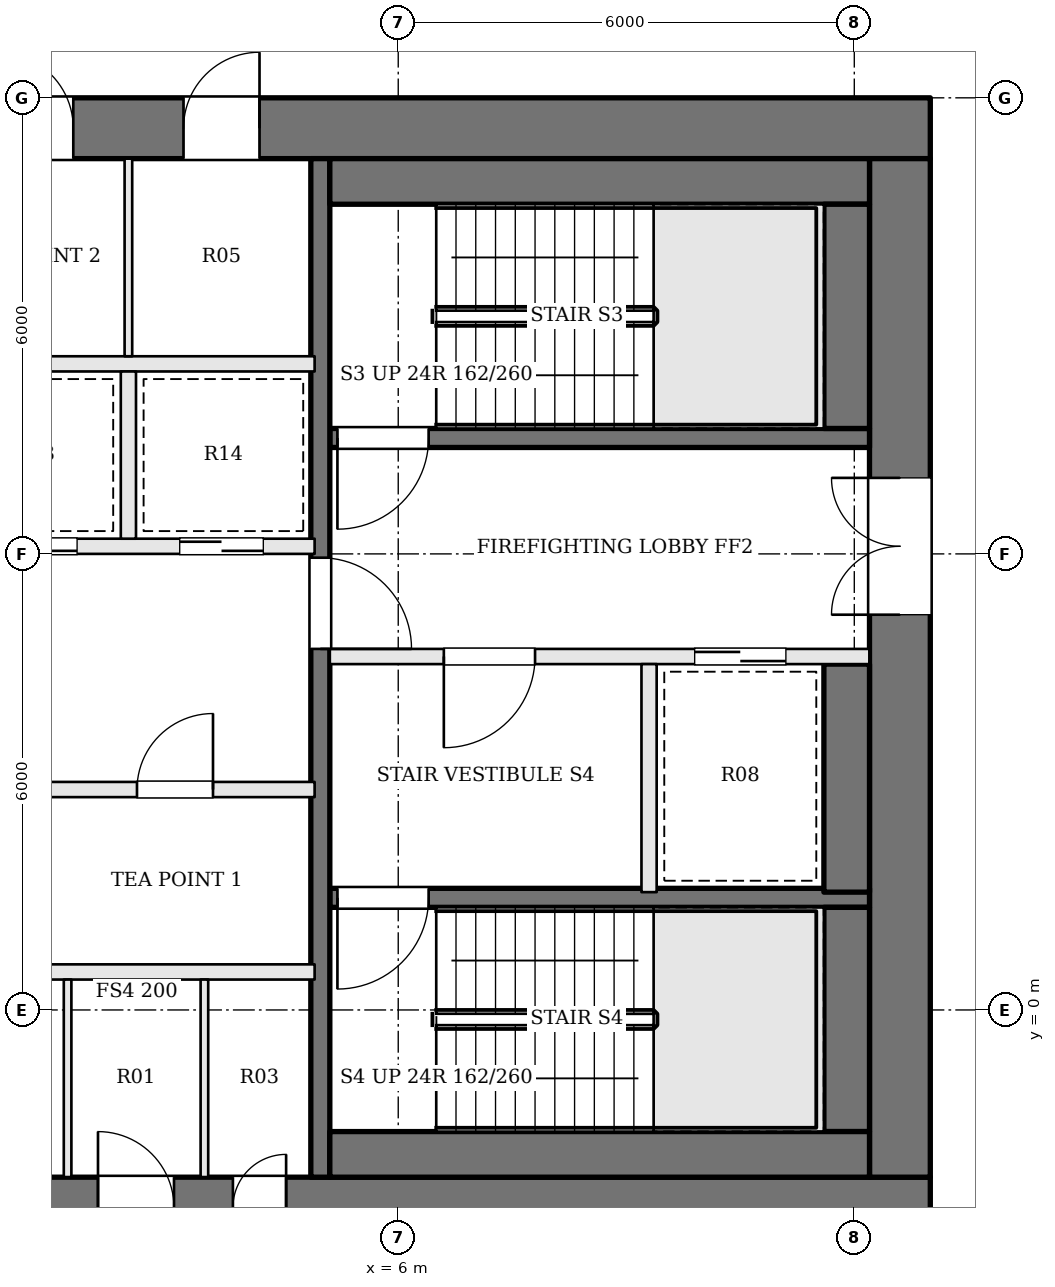
"""IFC4 building model, lengths in metres.
Left out: names, types, materials, properties, quantities, classifications, styles, units other than length and angle.
Written with IfcOpenShell. Run it as: python <this file> out.ifc"""

import sys

from ifc_helpers import new_model, si_unit, direction, frame, frame_2d, origin, place, context, subcontext, project, spatial, rectangle, extrude, element, fill, save


model = new_model("IFC4")
c1 = context("Model", 3, precision=1e-05, world=origin(), true_north=direction((0.0, 1.0)))
c2 = subcontext(c1, "Body", "Model", "MODEL_VIEW")
j1 = project(units=[si_unit("LENGTHUNIT", "METRE"), si_unit("PLANEANGLEUNIT", "RADIAN")], contexts=[c1])
p1 = place(None, origin())
s1 = spatial("IfcSite", under=j1, at=p1, CompositionType="ELEMENT")
p2 = place(p1, origin())
s2 = spatial("IfcBuilding", under=s1, at=p2, CompositionType="ELEMENT")
p3 = place(p2, frame((0.0, 0.0, 189.6)))
s3 = spatial("IfcBuildingStorey", under=s2, at=p3, CompositionType="ELEMENT", Elevation=189.6)
p4 = place(p3, frame((-13.0, 11.6, 0.0), z_axis=(0.0, 0.0, 1.0), x_axis=(1.0, 0.0, 0.0)))
e1 = element("IfcWall", 1, at=p4, inside=s3, PredefinedType="SHEAR", context=c2, shape_type="SweptSolid", body=[
    extrude(rectangle(XDim=26.0, YDim=0.8, at=frame_2d((13.0, 0.0))), origin(), (0.0, 0.0, 1.0), 3.9),
])
p5 = place(p4, frame((8.975, 0.0, 0.0)))
e2 = element("IfcOpeningElement", 2, at=p5, cuts=e1, PredefinedType="OPENING", context=c2, shape_type="SweptSolid", body=[
    extrude(rectangle(XDim=0.7, YDim=2.1, at=frame_2d((0.35, 1.05))), frame((0.0, 0.41, 0.0), z_axis=(0.0, -1.0, 0.0), x_axis=(1.0, 0.0, 0.0)), (0.0, 0.0, 1.0), 0.82),
])
p6 = place(p4, frame((11.425, 0.0, 0.0)))
e3 = element("IfcOpeningElement", 3, at=p6, cuts=e1, PredefinedType="OPENING", context=c2, shape_type="SweptSolid", body=[
    extrude(rectangle(XDim=0.7, YDim=2.1, at=frame_2d((0.35, 1.05))), frame((0.0, 0.41, 0.0), z_axis=(0.0, -1.0, 0.0), x_axis=(1.0, 0.0, 0.0)), (0.0, 0.0, 1.0), 0.82),
])
p7 = place(p4, frame((13.725, 0.0, 0.0)))
e4 = element("IfcOpeningElement", 4, at=p7, cuts=e1, PredefinedType="OPENING", context=c2, shape_type="SweptSolid", body=[
    extrude(rectangle(XDim=1.0, YDim=2.1, at=frame_2d((0.5, 1.05))), frame((0.0, 0.41, 0.0), z_axis=(0.0, -1.0, 0.0), x_axis=(1.0, 0.0, 0.0)), (0.0, 0.0, 1.0), 0.82),
])
p8 = place(p4, frame((16.175, 0.0, 0.0)))
e5 = element("IfcOpeningElement", 5, at=p8, cuts=e1, PredefinedType="OPENING", context=c2, shape_type="SweptSolid", body=[
    extrude(rectangle(XDim=1.0, YDim=2.1, at=frame_2d((0.5, 1.05))), frame((0.0, 0.41, 0.0), z_axis=(0.0, -1.0, 0.0), x_axis=(1.0, 0.0, 0.0)), (0.0, 0.0, 1.0), 0.82),
])
p9 = place(p3, frame((-13.0, -2.6, 0.0), z_axis=(0.0, 0.0, 1.0), x_axis=(1.0, 0.0, 0.0)))
e6 = element("IfcWall", 6, at=p9, inside=s3, PredefinedType="SHEAR", context=c2, shape_type="SweptSolid", body=[
    extrude(rectangle(XDim=26.0, YDim=0.8, at=frame_2d((13.0, 0.0))), origin(), (0.0, 0.0, 1.0), 3.9),
])
p10 = place(p9, frame((9.475, 0.0, 0.0)))
e7 = element("IfcOpeningElement", 7, at=p10, cuts=e6, PredefinedType="OPENING", context=c2, shape_type="SweptSolid", body=[
    extrude(rectangle(XDim=0.9, YDim=2.1, at=frame_2d((0.45, 1.05))), frame((0.0, 0.41, 0.0), z_axis=(0.0, -1.0, 0.0), x_axis=(1.0, 0.0, 0.0)), (0.0, 0.0, 1.0), 0.82),
])
p11 = place(p9, frame((12.75, 0.0, 0.0)))
e8 = element("IfcOpeningElement", 8, at=p11, cuts=e6, PredefinedType="OPENING", context=c2, shape_type="SweptSolid", body=[
    extrude(rectangle(XDim=0.9, YDim=2.1, at=frame_2d((0.45, 1.05))), frame((0.0, 0.41, 0.0), z_axis=(0.0, -1.0, 0.0), x_axis=(1.0, 0.0, 0.0)), (0.0, 0.0, 1.0), 0.82),
])
p12 = place(p9, frame((15.05, 0.0, 0.0)))
e9 = element("IfcOpeningElement", 9, at=p12, cuts=e6, PredefinedType="OPENING", context=c2, shape_type="SweptSolid", body=[
    extrude(rectangle(XDim=1.0, YDim=2.1, at=frame_2d((0.5, 1.05))), frame((0.0, 0.41, 0.0), z_axis=(0.0, -1.0, 0.0), x_axis=(1.0, 0.0, 0.0)), (0.0, 0.0, 1.0), 0.82),
])
p13 = place(p9, frame((16.825, 0.0, 0.0)))
e10 = element("IfcOpeningElement", 10, at=p13, cuts=e6, PredefinedType="OPENING", context=c2, shape_type="SweptSolid", body=[
    extrude(rectangle(XDim=0.7, YDim=2.1, at=frame_2d((0.35, 1.05))), frame((0.0, 0.41, 0.0), z_axis=(0.0, -1.0, 0.0), x_axis=(1.0, 0.0, 0.0)), (0.0, 0.0, 1.0), 0.82),
])
p14 = place(p3, frame((12.6, -2.2, 0.0), z_axis=(0.0, 0.0, 1.0), x_axis=(0.0, 1.0, 0.0)))
e11 = element("IfcWall", 11, at=p14, inside=s3, PredefinedType="SHEAR", context=c2, shape_type="SweptSolid", body=[
    extrude(rectangle(XDim=13.4, YDim=0.8, at=frame_2d((6.7, 0.0))), origin(), (0.0, 0.0, 1.0), 3.9),
])
p15 = place(p14, frame((7.4, 0.0, 0.0)))
e12 = element("IfcOpeningElement", 12, at=p15, cuts=e11, PredefinedType="OPENING", context=c2, shape_type="SweptSolid", body=[
    extrude(rectangle(XDim=1.8, YDim=2.1, at=frame_2d((0.9, 1.05))), frame((0.0, 0.41, 0.0), z_axis=(0.0, -1.0, 0.0), x_axis=(1.0, 0.0, 0.0)), (0.0, 0.0, 1.0), 0.82),
])
p16 = place(p3, frame((12.2, 7.525, 0.0), z_axis=(0.0, 0.0, 1.0), x_axis=(-1.0, 0.0, 0.0)))
e13 = element("IfcWall", 13, at=p16, inside=s3, PredefinedType="SOLIDWALL", context=c2, shape_type="SweptSolid", body=[
    extrude(rectangle(XDim=7.1, YDim=0.25, at=frame_2d((3.55, 0.0))), origin(), (0.0, 0.0, 1.0), 3.7),
])
p17 = place(p16, frame((5.8, 0.0, 0.0)))
e14 = element("IfcOpeningElement", 14, at=p17, cuts=e13, PredefinedType="OPENING", context=c2, shape_type="SweptSolid", body=[
    extrude(rectangle(XDim=1.2, YDim=2.1, at=frame_2d((0.6, 1.05))), frame((0.0, 0.135, 0.0), z_axis=(0.0, -1.0, 0.0), x_axis=(1.0, 0.0, 0.0)), (0.0, 0.0, 1.0), 0.27),
])
p18 = place(p3, frame((12.2, 4.65, 0.0), z_axis=(0.0, 0.0, 1.0), x_axis=(-1.0, 0.0, 0.0)))
e15 = element("IfcWall", 15, at=p18, inside=s3, PredefinedType="SOLIDWALL", context=c2, shape_type="SweptSolid", body=[
    extrude(rectangle(XDim=7.1, YDim=0.2, at=frame_2d((3.55, 0.0))), origin(), (0.0, 0.0, 1.0), 3.7),
])
p19 = place(p18, frame((4.4, 0.0, 0.0)))
e16 = element("IfcOpeningElement", 16, at=p19, cuts=e15, PredefinedType="OPENING", context=c2, shape_type="SweptSolid", body=[
    extrude(rectangle(XDim=1.2, YDim=2.1, at=frame_2d((0.6, 1.05))), frame((0.0, 0.11, 0.0), z_axis=(0.0, -1.0, 0.0), x_axis=(1.0, 0.0, 0.0)), (0.0, 0.0, 1.0), 0.22),
])
p20 = place(p18, frame((1.1, 0.0, 0.0)))
e17 = element("IfcOpeningElement", 17, at=p20, cuts=e15, PredefinedType="OPENING", context=c2, shape_type="SweptSolid", body=[
    extrude(rectangle(XDim=1.2, YDim=2.1, at=frame_2d((0.6, 1.05))), frame((0.0, 0.11, 0.0), z_axis=(0.0, -1.0, 0.0), x_axis=(1.0, 0.0, 0.0)), (0.0, 0.0, 1.0), 0.22),
])
p21 = place(p3, frame((12.2, 1.475, 0.0), z_axis=(0.0, 0.0, 1.0), x_axis=(-1.0, 0.0, 0.0)))
e18 = element("IfcWall", 18, at=p21, inside=s3, PredefinedType="SOLIDWALL", context=c2, shape_type="SweptSolid", body=[
    extrude(rectangle(XDim=7.1, YDim=0.25, at=frame_2d((3.55, 0.0))), origin(), (0.0, 0.0, 1.0), 3.7),
])
p22 = place(p21, frame((5.8, 0.0, 0.0)))
e19 = element("IfcOpeningElement", 19, at=p22, cuts=e18, PredefinedType="OPENING", context=c2, shape_type="SweptSolid", body=[
    extrude(rectangle(XDim=1.2, YDim=2.1, at=frame_2d((0.6, 1.05))), frame((0.0, 0.135, 0.0), z_axis=(0.0, -1.0, 0.0), x_axis=(1.0, 0.0, 0.0)), (0.0, 0.0, 1.0), 0.27),
])
p23 = place(p3, frame((9.3, 4.55, 0.0), z_axis=(0.0, 0.0, 1.0), x_axis=(0.0, -1.0, 0.0)))
e20 = element("IfcWall", 20, at=p23, inside=s3, PredefinedType="SOLIDWALL", context=c2, shape_type="SweptSolid", body=[
    extrude(rectangle(XDim=3.0, YDim=0.2, at=frame_2d((1.5, 0.0))), origin(), (0.0, 0.0, 1.0), 3.7),
])
p24 = place(p3, frame((4.975, 11.2, 0.0), z_axis=(0.0, 0.0, 1.0), x_axis=(0.0, -1.0, 0.0)))
e21 = element("IfcWall", 21, at=p24, inside=s3, PredefinedType="SOLIDWALL", context=c2, shape_type="SweptSolid", body=[
    extrude(rectangle(XDim=13.4, YDim=0.25, at=frame_2d((6.7, 0.0))), origin(), (0.0, 0.0, 1.0), 3.7),
])
p25 = place(p24, frame((5.25, 0.0, 0.0)))
e22 = element("IfcOpeningElement", 22, at=p25, cuts=e21, PredefinedType="OPENING", context=c2, shape_type="SweptSolid", body=[
    extrude(rectangle(XDim=1.2, YDim=2.1, at=frame_2d((0.6, 1.05))), frame((0.0, 0.135, 0.0), z_axis=(0.0, -1.0, 0.0), x_axis=(1.0, 0.0, 0.0)), (0.0, 0.0, 1.0), 0.27),
])
p26 = place(p3, frame((12.2, 10.9, 0.0), z_axis=(0.0, 0.0, 1.0), x_axis=(-1.0, 0.0, 0.0)))
e23 = element("IfcWall", 23, at=p26, inside=s3, PredefinedType="SOLIDWALL", context=c2, shape_type="SweptSolid", body=[
    extrude(rectangle(XDim=7.1, YDim=0.6, at=frame_2d((3.55, 0.0))), origin(), (0.0, 0.0, 1.0), 3.7),
])
p27 = place(p3, frame((11.9, 10.6, 0.0), z_axis=(0.0, 0.0, 1.0), x_axis=(0.0, -1.0, 0.0)))
e24 = element("IfcWall", 24, at=p27, inside=s3, PredefinedType="SOLIDWALL", context=c2, shape_type="SweptSolid", body=[
    extrude(rectangle(XDim=2.95, YDim=0.6, at=frame_2d((1.475, 0.0))), origin(), (0.0, 0.0, 1.0), 3.7),
])
p28 = place(p3, frame((11.9, 4.55, 0.0), z_axis=(0.0, 0.0, 1.0), x_axis=(0.0, -1.0, 0.0)))
e25 = element("IfcWall", 25, at=p28, inside=s3, PredefinedType="SOLIDWALL", context=c2, shape_type="SweptSolid", body=[
    extrude(rectangle(XDim=3.0, YDim=0.6, at=frame_2d((1.5, 0.0))), origin(), (0.0, 0.0, 1.0), 3.7),
])
p29 = place(p3, frame((11.9, 1.35, 0.0), z_axis=(0.0, 0.0, 1.0), x_axis=(0.0, -1.0, 0.0)))
e26 = element("IfcWall", 26, at=p29, inside=s3, PredefinedType="SOLIDWALL", context=c2, shape_type="SweptSolid", body=[
    extrude(rectangle(XDim=2.95, YDim=0.6, at=frame_2d((1.475, 0.0))), origin(), (0.0, 0.0, 1.0), 3.7),
])
p30 = place(p3, frame((12.2, -1.9, 0.0), z_axis=(0.0, 0.0, 1.0), x_axis=(-1.0, 0.0, 0.0)))
e27 = element("IfcWall", 27, at=p30, inside=s3, PredefinedType="SOLIDWALL", context=c2, shape_type="SweptSolid", body=[
    extrude(rectangle(XDim=7.1, YDim=0.6, at=frame_2d((3.55, 0.0))), origin(), (0.0, 0.0, 1.0), 3.7),
])
p31 = place(p3, frame((-4.9, 0.5, 0.0), z_axis=(0.0, 0.0, 1.0), x_axis=(1.0, 0.0, 0.0)))
e28 = element("IfcWall", 28, at=p31, inside=s3, PredefinedType="SOLIDWALL", context=c2, shape_type="SweptSolid", body=[
    extrude(rectangle(XDim=9.8, YDim=0.2, at=frame_2d((4.9, 0.0))), origin(), (0.0, 0.0, 1.0), 3.7),
])
p32 = place(p3, frame((-4.9, 2.9, 0.0), z_axis=(0.0, 0.0, 1.0), x_axis=(1.0, 0.0, 0.0)))
e29 = element("IfcWall", 29, at=p32, inside=s3, PredefinedType="SOLIDWALL", context=c2, shape_type="SweptSolid", body=[
    extrude(rectangle(XDim=9.8, YDim=0.2, at=frame_2d((4.9, 0.0))), origin(), (0.0, 0.0, 1.0), 3.7),
])
p33 = place(p32, frame((0.675, 0.0, 0.0)))
e30 = element("IfcOpeningElement", 30, at=p33, cuts=e29, PredefinedType="OPENING", context=c2, shape_type="SweptSolid", body=[
    extrude(rectangle(XDim=1.1, YDim=2.1, at=frame_2d((0.55, 1.05))), frame((0.0, 0.11, 0.0), z_axis=(0.0, -1.0, 0.0), x_axis=(1.0, 0.0, 0.0)), (0.0, 0.0, 1.0), 0.22),
])
p34 = place(p32, frame((2.613, 0.0, 0.0)))
e31 = element("IfcOpeningElement", 31, at=p34, cuts=e29, PredefinedType="OPENING", context=c2, shape_type="SweptSolid", body=[
    extrude(rectangle(XDim=0.9, YDim=2.1, at=frame_2d((0.45, 1.05))), frame((0.0, 0.11, 0.0), z_axis=(0.0, -1.0, 0.0), x_axis=(1.0, 0.0, 0.0)), (0.0, 0.0, 1.0), 0.22),
])
p35 = place(p32, frame((4.35, 0.0, 0.0)))
e32 = element("IfcOpeningElement", 32, at=p35, cuts=e29, PredefinedType="OPENING", context=c2, shape_type="SweptSolid", body=[
    extrude(rectangle(XDim=1.1, YDim=2.1, at=frame_2d((0.55, 1.05))), frame((0.0, 0.11, 0.0), z_axis=(0.0, -1.0, 0.0), x_axis=(1.0, 0.0, 0.0)), (0.0, 0.0, 1.0), 0.22),
])
p36 = place(p32, frame((7.463, 0.0, 0.0)))
e33 = element("IfcOpeningElement", 33, at=p36, cuts=e29, PredefinedType="OPENING", context=c2, shape_type="SweptSolid", body=[
    extrude(rectangle(XDim=1.0, YDim=2.1, at=frame_2d((0.5, 1.05))), frame((0.0, 0.11, 0.0), z_axis=(0.0, -1.0, 0.0), x_axis=(1.0, 0.0, 0.0)), (0.0, 0.0, 1.0), 0.22),
])
p37 = place(p3, frame((-4.9, 6.1, 0.0), z_axis=(0.0, 0.0, 1.0), x_axis=(1.0, 0.0, 0.0)))
e34 = element("IfcWall", 34, at=p37, inside=s3, PredefinedType="SOLIDWALL", context=c2, shape_type="SweptSolid", body=[
    extrude(rectangle(XDim=9.8, YDim=0.2, at=frame_2d((4.9, 0.0))), origin(), (0.0, 0.0, 1.0), 3.7),
])
p38 = place(p37, frame((0.675, 0.0, 0.0)))
e35 = element("IfcOpeningElement", 35, at=p38, cuts=e34, PredefinedType="OPENING", context=c2, shape_type="SweptSolid", body=[
    extrude(rectangle(XDim=1.1, YDim=2.1, at=frame_2d((0.55, 1.05))), frame((0.0, 0.11, 0.0), z_axis=(0.0, -1.0, 0.0), x_axis=(1.0, 0.0, 0.0)), (0.0, 0.0, 1.0), 0.22),
])
p39 = place(p37, frame((3.125, 0.0, 0.0)))
e36 = element("IfcOpeningElement", 36, at=p39, cuts=e34, PredefinedType="OPENING", context=c2, shape_type="SweptSolid", body=[
    extrude(rectangle(XDim=1.1, YDim=2.1, at=frame_2d((0.55, 1.05))), frame((0.0, 0.11, 0.0), z_axis=(0.0, -1.0, 0.0), x_axis=(1.0, 0.0, 0.0)), (0.0, 0.0, 1.0), 0.22),
])
p40 = place(p37, frame((5.575, 0.0, 0.0)))
e37 = element("IfcOpeningElement", 37, at=p40, cuts=e34, PredefinedType="OPENING", context=c2, shape_type="SweptSolid", body=[
    extrude(rectangle(XDim=1.1, YDim=2.1, at=frame_2d((0.55, 1.05))), frame((0.0, 0.11, 0.0), z_axis=(0.0, -1.0, 0.0), x_axis=(1.0, 0.0, 0.0)), (0.0, 0.0, 1.0), 0.22),
])
p41 = place(p37, frame((8.025, 0.0, 0.0)))
e38 = element("IfcOpeningElement", 38, at=p41, cuts=e34, PredefinedType="OPENING", context=c2, shape_type="SweptSolid", body=[
    extrude(rectangle(XDim=1.1, YDim=2.1, at=frame_2d((0.55, 1.05))), frame((0.0, 0.11, 0.0), z_axis=(0.0, -1.0, 0.0), x_axis=(1.0, 0.0, 0.0)), (0.0, 0.0, 1.0), 0.22),
])
p42 = place(p3, frame((-4.9, 8.5, 0.0), z_axis=(0.0, 0.0, 1.0), x_axis=(1.0, 0.0, 0.0)))
e39 = element("IfcWall", 39, at=p42, inside=s3, PredefinedType="SOLIDWALL", context=c2, shape_type="SweptSolid", body=[
    extrude(rectangle(XDim=9.8, YDim=0.2, at=frame_2d((4.9, 0.0))), origin(), (0.0, 0.0, 1.0), 3.7),
])
p43 = place(p3, frame((2.45, 6.2, 0.0), z_axis=(0.0, 0.0, 1.0), x_axis=(0.0, 1.0, 0.0)))
e40 = element("IfcWall", 40, at=p43, inside=s3, PredefinedType="SOLIDWALL", context=c2, shape_type="SweptSolid", body=[
    extrude(rectangle(XDim=2.2, YDim=0.2, at=frame_2d((1.1, 0.0))), origin(), (0.0, 0.0, 1.0), 3.7),
])
for number, where, z_axis, x_axis in (
    (41, (1.65, -2.2, 0.0), (0.0, 0.0, 1.0), (0.0, 1.0, 0.0)),
    (42, (3.45, -2.2, 0.0), (0.0, 0.0, 1.0), (0.0, 1.0, 0.0)),
    (43, (2.45, 8.6, 0.0), (0.0, 0.0, 1.0), (0.0, 1.0, 0.0)),
):
    element("IfcWall", number, at=place(p3, frame(where, z_axis=z_axis, x_axis=x_axis)), inside=s3, PredefinedType="PARTITIONING", context=c2, shape_type="SweptSolid", body=[
        extrude(rectangle(XDim=2.6, YDim=0.1, at=frame_2d((1.3, 0.0))), origin(), (0.0, 0.0, 1.0), 3.7),
    ])
p44 = place(p15, origin())
e44 = element("IfcDoor", 44, at=p44, inside=s3, OperationType="DOUBLE_DOOR_SINGLE_SWING", PredefinedType="DOOR", context=c2, shape_type="SweptSolid", body=[
    extrude(rectangle(XDim=1.8, YDim=2.1, at=frame_2d((0.9, 1.05))), frame((0.0, 0.025, 0.0), z_axis=(0.0, -1.0, 0.0), x_axis=(1.0, 0.0, 0.0)), (0.0, 0.0, 1.0), 0.05),
])
fill(e12, e44)
p45 = place(p25, origin())
e45 = element("IfcDoor", 45, at=p45, inside=s3, OperationType="SINGLE_SWING_RIGHT", PredefinedType="DOOR", context=c2, shape_type="SweptSolid", body=[
    extrude(rectangle(XDim=1.2, YDim=2.1, at=frame_2d((0.6, 1.05))), frame((0.0, 0.025, 0.0), z_axis=(0.0, -1.0, 0.0), x_axis=(1.0, 0.0, 0.0)), (0.0, 0.0, 1.0), 0.05),
])
fill(e22, e45)
p46 = place(p19, origin())
e46 = element("IfcDoor", 46, at=p46, inside=s3, OperationType="SINGLE_SWING_RIGHT", PredefinedType="DOOR", context=c2, shape_type="SweptSolid", body=[
    extrude(rectangle(XDim=1.2, YDim=2.1, at=frame_2d((0.6, 1.05))), frame((0.0, 0.025, 0.0), z_axis=(0.0, -1.0, 0.0), x_axis=(1.0, 0.0, 0.0)), (0.0, 0.0, 1.0), 0.05),
])
fill(e16, e46)
p47 = place(p17, origin())
e47 = element("IfcDoor", 47, at=p47, inside=s3, OperationType="SINGLE_SWING_RIGHT", PredefinedType="DOOR", context=c2, shape_type="SweptSolid", body=[
    extrude(rectangle(XDim=1.2, YDim=2.1, at=frame_2d((0.6, 1.05))), frame((0.0, 0.025, 0.0), z_axis=(0.0, -1.0, 0.0), x_axis=(1.0, 0.0, 0.0)), (0.0, 0.0, 1.0), 0.05),
])
fill(e14, e47)
p48 = place(p22, origin())
e48 = element("IfcDoor", 48, at=p48, inside=s3, OperationType="SINGLE_SWING_RIGHT", PredefinedType="DOOR", context=c2, shape_type="SweptSolid", body=[
    extrude(rectangle(XDim=1.2, YDim=2.1, at=frame_2d((0.6, 1.05))), frame((0.0, 0.025, 0.0), z_axis=(0.0, -1.0, 0.0), x_axis=(1.0, 0.0, 0.0)), (0.0, 0.0, 1.0), 0.05),
])
fill(e19, e48)
p49 = place(p20, origin())
e49 = element("IfcDoor", 49, at=p49, inside=s3, OperationType="SLIDING_TO_RIGHT", PredefinedType="DOOR", context=c2, shape_type="SweptSolid", body=[
    extrude(rectangle(XDim=1.2, YDim=2.1, at=frame_2d((0.6, 1.05))), frame((0.0, 0.025, 0.0), z_axis=(0.0, -1.0, 0.0), x_axis=(1.0, 0.0, 0.0)), (0.0, 0.0, 1.0), 0.05),
])
fill(e17, e49)
p50 = place(p36, origin())
e50 = element("IfcDoor", 50, at=p50, inside=s3, OperationType="SINGLE_SWING_RIGHT", PredefinedType="DOOR", context=c2, shape_type="SweptSolid", body=[
    extrude(rectangle(XDim=1.0, YDim=2.1, at=frame_2d((0.5, 1.05))), frame((0.0, 0.025, 0.0), z_axis=(0.0, -1.0, 0.0), x_axis=(1.0, 0.0, 0.0)), (0.0, 0.0, 1.0), 0.05),
])
fill(e33, e50)
p51 = place(p40, origin())
e51 = element("IfcDoor", 51, at=p51, inside=s3, OperationType="SLIDING_TO_RIGHT", PredefinedType="DOOR", context=c2, shape_type="SweptSolid", body=[
    extrude(rectangle(XDim=1.1, YDim=2.1, at=frame_2d((0.55, 1.05))), frame((0.0, 0.025, 0.0), z_axis=(0.0, -1.0, 0.0), x_axis=(1.0, 0.0, 0.0)), (0.0, 0.0, 1.0), 0.05),
])
fill(e37, e51)
p52 = place(p41, origin())
e52 = element("IfcDoor", 52, at=p52, inside=s3, OperationType="SLIDING_TO_LEFT", PredefinedType="DOOR", context=c2, shape_type="SweptSolid", body=[
    extrude(rectangle(XDim=1.1, YDim=2.1, at=frame_2d((0.55, 1.05))), frame((0.0, 0.025, 0.0), z_axis=(0.0, -1.0, 0.0), x_axis=(1.0, 0.0, 0.0)), (0.0, 0.0, 1.0), 0.05),
])
fill(e38, e52)
p53 = place(p12, origin())
e53 = element("IfcDoor", 53, at=p53, inside=s3, OperationType="SINGLE_SWING_LEFT", PredefinedType="DOOR", context=c2, shape_type="SweptSolid", body=[
    extrude(rectangle(XDim=1.0, YDim=2.1, at=frame_2d((0.5, 1.05))), frame((0.0, 0.025, 0.0), z_axis=(0.0, -1.0, 0.0), x_axis=(1.0, 0.0, 0.0)), (0.0, 0.0, 1.0), 0.05),
])
fill(e9, e53)
p54 = place(p13, origin())
e54 = element("IfcDoor", 54, at=p54, inside=s3, OperationType="SINGLE_SWING_RIGHT", PredefinedType="DOOR", context=c2, shape_type="SweptSolid", body=[
    extrude(rectangle(XDim=0.7, YDim=2.1, at=frame_2d((0.35, 1.05))), frame((0.0, 0.025, 0.0), z_axis=(0.0, -1.0, 0.0), x_axis=(1.0, 0.0, 0.0)), (0.0, 0.0, 1.0), 0.05),
])
fill(e10, e54)
p55 = place(p7, origin())
e55 = element("IfcDoor", 55, at=p55, inside=s3, OperationType="SINGLE_SWING_LEFT", PredefinedType="DOOR", context=c2, shape_type="SweptSolid", body=[
    extrude(rectangle(XDim=1.0, YDim=2.1, at=frame_2d((0.5, 1.05))), frame((0.0, 0.025, 0.0), z_axis=(0.0, -1.0, 0.0), x_axis=(1.0, 0.0, 0.0)), (0.0, 0.0, 1.0), 0.05),
])
fill(e4, e55)
p56 = place(p8, origin())
e56 = element("IfcDoor", 56, at=p56, inside=s3, OperationType="SINGLE_SWING_RIGHT", PredefinedType="DOOR", context=c2, shape_type="SweptSolid", body=[
    extrude(rectangle(XDim=1.0, YDim=2.1, at=frame_2d((0.5, 1.05))), frame((0.0, 0.025, 0.0), z_axis=(0.0, -1.0, 0.0), x_axis=(1.0, 0.0, 0.0)), (0.0, 0.0, 1.0), 0.05),
])
fill(e5, e56)
save(model, sys.argv[1])
